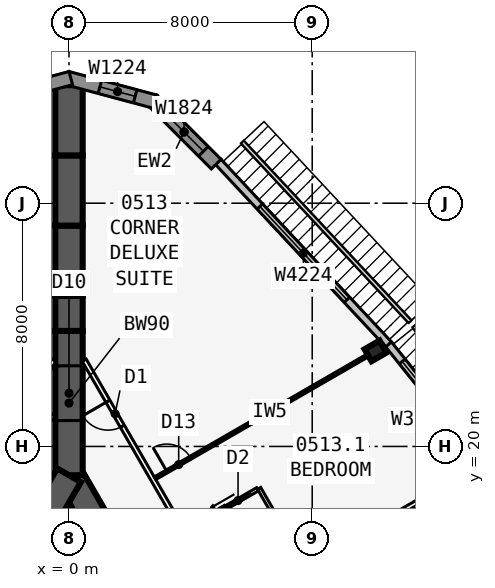
"""IFC4 building model, lengths in metres.
Left out: names, types, materials, properties, quantities, classifications, styles, units other than length and angle.
Written with IfcOpenShell. Run it as: python <this file> out.ifc"""

import sys

from ifc_helpers import new_model, si_unit, direction, frame, frame_2d, origin, origin_2d, place, context, subcontext, project, spatial, polyline, rectangle, i_section, outline, extrude, element, fill, save


model = new_model("IFC4")
c1 = context("Model", 3, precision=1e-05, world=origin(), true_north=direction((0.0, 1.0)))
c2 = subcontext(c1, "Body", "Model", "MODEL_VIEW")
j1 = project(units=[si_unit("LENGTHUNIT", "METRE"), si_unit("PLANEANGLEUNIT", "RADIAN")], contexts=[c1])
p1 = place(None, origin())
s1 = spatial("IfcSite", under=j1, at=p1, CompositionType="ELEMENT")
p2 = place(p1, origin())
s2 = spatial("IfcBuilding", under=s1, at=p2, CompositionType="ELEMENT")
p3 = place(p2, frame((0.0, 0.0, 28.5)))
s3 = spatial("IfcBuildingStorey", under=s2, at=p3, CompositionType="ELEMENT", Elevation=28.5)
p4 = place(p3, frame((16.5, -9.526, 0.0), z_axis=(0.0, 0.0, 1.0), x_axis=(-0.499999749417, 0.866025548458, 0.0)))
e1 = element("IfcWall", 1, at=p4, inside=s3, PredefinedType="SHEAR", context=c2, shape_type="SweptSolid", body=[
    extrude(rectangle(XDim=33.0, YDim=0.9, at=frame_2d((16.5, 0.0))), origin(), (0.0, 0.0, 1.0), 3.4),
])
p5 = place(p4, frame((14.15, 0.0, 0.0)))
e2 = element("IfcOpeningElement", 2, at=p5, cuts=e1, PredefinedType="OPENING", context=c2, shape_type="SweptSolid", body=[
    extrude(rectangle(XDim=1.8, YDim=2.13, at=frame_2d((0.9, 1.065))), frame((0.0, 0.46, 0.0), z_axis=(0.0, -1.0, 0.0), x_axis=(1.0, 0.0, 0.0)), (0.0, 0.0, 1.0), 0.92),
])
p6 = place(p4, frame((12.6, 0.0, 0.0)))
e3 = element("IfcOpeningElement", 3, at=p6, cuts=e1, PredefinedType="OPENING", context=c2, shape_type="SweptSolid", body=[
    extrude(rectangle(XDim=1.0, YDim=2.13, at=frame_2d((0.5, 1.065))), frame((0.0, 0.46, 0.0), z_axis=(0.0, -1.0, 0.0), x_axis=(1.0, 0.0, 0.0)), (0.0, 0.0, 1.0), 0.92),
])
p7 = place(p3, frame((0.0, 19.052, 0.0), z_axis=(0.0, 0.0, 1.0), x_axis=(-0.499999749417, -0.866025548458, 0.0)))
e4 = element("IfcWall", 4, at=p7, inside=s3, PredefinedType="SHEAR", context=c2, shape_type="SweptSolid", body=[
    extrude(rectangle(XDim=33.0, YDim=0.9, at=frame_2d((16.5, 0.0))), origin(), (0.0, 0.0, 1.0), 3.4),
])
p8 = place(p7, frame((14.15, 0.0, 0.0)))
e5 = element("IfcOpeningElement", 5, at=p8, cuts=e4, PredefinedType="OPENING", context=c2, shape_type="SweptSolid", body=[
    extrude(rectangle(XDim=1.8, YDim=2.13, at=frame_2d((0.9, 1.065))), frame((0.0, 0.46, 0.0), z_axis=(0.0, -1.0, 0.0), x_axis=(1.0, 0.0, 0.0)), (0.0, 0.0, 1.0), 0.92),
])
p9 = place(p7, frame((12.6, 0.0, 0.0)))
e6 = element("IfcOpeningElement", 6, at=p9, cuts=e4, PredefinedType="OPENING", context=c2, shape_type="SweptSolid", body=[
    extrude(rectangle(XDim=1.0, YDim=2.13, at=frame_2d((0.5, 1.065))), frame((0.0, 0.46, 0.0), z_axis=(0.0, -1.0, 0.0), x_axis=(1.0, 0.0, 0.0)), (0.0, 0.0, 1.0), 0.92),
])
p10 = place(p3, frame((0.0, 19.052, 0.0), z_axis=(0.0, 0.0, 1.0), x_axis=(0.0, 1.0, 0.0)))
e7 = element("IfcWall", 7, at=p10, inside=s3, PredefinedType="SHEAR", context=c2, shape_type="SweptSolid", body=[
    extrude(rectangle(XDim=4.746, YDim=0.9, at=frame_2d((2.373, 0.0))), origin(), (0.0, 0.0, 1.0), 3.4),
])
p11 = place(p10, frame((1.8, 0.0, 0.0)))
e8 = element("IfcOpeningElement", 8, at=p11, cuts=e7, PredefinedType="OPENING", context=c2, shape_type="SweptSolid", body=[
    extrude(rectangle(XDim=1.8, YDim=2.13, at=frame_2d((0.9, 1.065))), frame((0.0, 0.46, 0.0), z_axis=(0.0, -1.0, 0.0), x_axis=(1.0, 0.0, 0.0)), (0.0, 0.0, 1.0), 0.92),
])
p12 = place(p3, frame((0.0, 23.799, 0.0), z_axis=(0.0, 0.0, 1.0), x_axis=(0.0, 1.0, 0.0)))
e9 = element("IfcWall", 9, at=p12, inside=s3, PredefinedType="SHEAR", context=c2, shape_type="SweptSolid", body=[
    extrude(rectangle(XDim=1.155, YDim=0.9, at=frame_2d((0.577, 0.0))), origin(), (0.0, 0.0, 1.0), 3.4),
])
p13 = place(p3, frame((0.0, 24.953, 0.0), z_axis=(0.0, 0.0, 1.0), x_axis=(0.0, 1.0, 0.0)))
e10 = element("IfcWall", 10, at=p13, inside=s3, PredefinedType="SHEAR", context=c2, shape_type="SweptSolid", body=[
    extrude(rectangle(XDim=2.309, YDim=0.9, at=frame_2d((1.155, 0.0))), origin(), (0.0, 0.0, 1.0), 3.4),
])
p14 = place(p3, frame((0.0, 27.263, 0.0), z_axis=(0.0, 0.0, 1.0), x_axis=(0.0, 1.0, 0.0)))
e11 = element("IfcWall", 11, at=p14, inside=s3, PredefinedType="SHEAR", context=c2, shape_type="SweptSolid", body=[
    extrude(rectangle(XDim=2.31, YDim=0.9, at=frame_2d((1.155, 0.0))), origin(), (0.0, 0.0, 1.0), 3.4),
])
p15 = place(p3, frame((0.0, 29.572, 0.0), z_axis=(0.0, 0.0, 1.0), x_axis=(0.0, 1.0, 0.0)))
e12 = element("IfcWall", 12, at=p15, inside=s3, PredefinedType="SHEAR", context=c2, shape_type="SweptSolid", body=[
    extrude(rectangle(XDim=2.309, YDim=0.9, at=frame_2d((1.155, 0.0))), origin(), (0.0, 0.0, 1.0), 3.4),
])
p16 = place(p3, frame((10.083, 23.142, 0.0), z_axis=(0.0, 0.0, 1.0), x_axis=(-0.5, 0.866025403784, 0.0)))
e13 = element("IfcColumn", 13, at=p16, inside=s3, PredefinedType="COLUMN", context=c2, shape_type="SweptSolid", body=[
    extrude(i_section(OverallWidth=0.455, OverallDepth=0.569, WebThickness=0.078, FlangeThickness=0.125, at=origin_2d()), origin(), (0.0, 0.0, 1.0), 3.4),
])
p17 = place(p3, frame((13.664, 19.414, 0.0), z_axis=(0.0, 0.0, 1.0), x_axis=(-0.624594965756, 0.780948864364, 0.0)))
e14 = element("IfcWall", 14, at=p17, inside=s3, PredefinedType="STANDARD", context=c2, shape_type="SweptSolid", body=[
    extrude(rectangle(XDim=5.058, YDim=0.25, at=frame_2d((2.529, 0.0))), origin(), (0.0, 0.0, 1.0), 3.235),
])
p18 = place(p17, frame((0.729, 0.0, 0.45)))
e15 = element("IfcOpeningElement", 15, at=p18, cuts=e14, PredefinedType="OPENING", context=c2, shape_type="SweptSolid", body=[
    extrude(rectangle(XDim=3.6, YDim=2.4, at=frame_2d((1.8, 1.2))), frame((0.0, 0.135, 0.0), z_axis=(0.0, -1.0, 0.0), x_axis=(1.0, 0.0, 0.0)), (0.0, 0.0, 1.0), 0.27),
])
p19 = place(p3, frame((10.511, 23.357, 0.0), z_axis=(0.0, 0.0, 1.0), x_axis=(-0.682289646561, 0.731081964075, 0.0)))
e16 = element("IfcWall", 16, at=p19, inside=s3, PredefinedType="STANDARD", context=c2, shape_type="SweptSolid", body=[
    extrude(rectangle(XDim=8.211, YDim=0.25, at=frame_2d((4.105, 0.0))), origin(), (0.0, 0.0, 1.0), 3.235),
])
p20 = place(p19, frame((2.006, 0.0, 0.45)))
e17 = element("IfcOpeningElement", 17, at=p20, cuts=e16, PredefinedType="OPENING", context=c2, shape_type="SweptSolid", body=[
    extrude(rectangle(XDim=4.2, YDim=2.4, at=frame_2d((2.1, 1.2))), frame((0.0, 0.135, 0.0), z_axis=(0.0, -1.0, 0.0), x_axis=(1.0, 0.0, 0.0)), (0.0, 0.0, 1.0), 0.27),
])
p21 = place(p3, frame((4.841, 29.286, 0.0), z_axis=(0.0, 0.0, 1.0), x_axis=(-0.707106781187, 0.707106781187, 0.0)))
e18 = element("IfcWall", 18, at=p21, inside=s3, PredefinedType="SOLIDWALL", context=c2, shape_type="SweptSolid", body=[
    extrude(rectangle(XDim=2.988, YDim=0.45, at=frame_2d((1.494, 0.0))), origin(), (0.0, 0.0, 1.0), 3.235),
])
p22 = place(p21, frame((0.594, 0.0, 0.45)))
e19 = element("IfcOpeningElement", 19, at=p22, cuts=e18, PredefinedType="OPENING", context=c2, shape_type="SweptSolid", body=[
    extrude(rectangle(XDim=1.8, YDim=2.4, at=frame_2d((0.9, 1.2))), frame((0.0, 0.235, 0.0), z_axis=(0.0, -1.0, 0.0), x_axis=(1.0, 0.0, 0.0)), (0.0, 0.0, 1.0), 0.47),
])
p23 = place(p3, frame((2.829, 31.341, 0.0), z_axis=(0.0, 0.0, 1.0), x_axis=(-0.965930548995, 0.258801419081, 0.0)))
e20 = element("IfcWall", 20, at=p23, inside=s3, PredefinedType="SOLIDWALL", context=c2, shape_type="SweptSolid", body=[
    extrude(outline(polyline([(2.989, 0.225), (2.929, 0.225), (2.438, 0.093), (2.402, 0.225), (0.0, 0.225), (0.0, -0.225), (2.989, -0.225), (2.989, 0.225)])), origin(), (0.0, 0.0, 1.0), 3.235),
])
p24 = place(p23, frame((0.676, 0.0, 0.45)))
e21 = element("IfcOpeningElement", 21, at=p24, cuts=e20, PredefinedType="OPENING", context=c2, shape_type="SweptSolid", body=[
    extrude(rectangle(XDim=1.2, YDim=2.4, at=frame_2d((0.6, 1.2))), frame((0.0, 0.235, 0.0), z_axis=(0.0, -1.0, 0.0), x_axis=(1.0, 0.0, 0.0)), (0.0, 0.0, 1.0), 0.47),
])
p25 = place(p3, frame((0.058, 32.114, 0.0), z_axis=(0.0, 0.0, 1.0), x_axis=(-0.965930548995, -0.258801419081, 0.0)))
e22 = element("IfcWall", 22, at=p25, inside=s3, PredefinedType="SOLIDWALL", context=c2, shape_type="SweptSolid", body=[
    extrude(outline(polyline([(2.989, 0.225), (0.586, 0.225), (0.551, 0.093), (0.059, 0.225), (0.0, 0.225), (0.0, -0.225), (2.989, -0.225), (2.989, 0.225)])), origin(), (0.0, 0.0, 1.0), 3.235),
])
p26 = place(p25, frame((1.113, 0.0, 0.45)))
e23 = element("IfcOpeningElement", 23, at=p26, cuts=e22, PredefinedType="OPENING", context=c2, shape_type="SweptSolid", body=[
    extrude(rectangle(XDim=1.2, YDim=2.4, at=frame_2d((0.6, 1.2))), frame((0.0, 0.235, 0.0), z_axis=(0.0, -1.0, 0.0), x_axis=(1.0, 0.0, 0.0)), (0.0, 0.0, 1.0), 0.47),
])
p27 = place(p3, frame((20.027, -10.985, 0.0), z_axis=(0.0, 0.0, 1.0), x_axis=(-0.500001677587, 0.866024435227, 0.0)))
e24 = element("IfcWall", 24, at=p27, inside=s3, PredefinedType="PARTITIONING", context=c2, shape_type="SweptSolid", body=[
    extrude(rectangle(XDim=39.054, YDim=0.15, at=frame_2d((19.527, 0.0))), origin(), (0.0, 0.0, 1.0), 3.235),
])
p28 = place(p27, frame((0.352, 0.0, 0.0)))
e25 = element("IfcOpeningElement", 25, at=p28, cuts=e24, PredefinedType="OPENING", context=c2, shape_type="SweptSolid", body=[
    extrude(rectangle(XDim=0.95, YDim=2.13, at=frame_2d((0.475, 1.065))), frame((0.0, 0.085, 0.0), z_axis=(0.0, -1.0, 0.0), x_axis=(1.0, 0.0, 0.0)), (0.0, 0.0, 1.0), 0.17),
])
p29 = place(p27, frame((5.952, 0.0, 0.0)))
e26 = element("IfcOpeningElement", 26, at=p29, cuts=e24, PredefinedType="OPENING", context=c2, shape_type="SweptSolid", body=[
    extrude(rectangle(XDim=0.95, YDim=2.13, at=frame_2d((0.475, 1.065))), frame((0.0, 0.085, 0.0), z_axis=(0.0, -1.0, 0.0), x_axis=(1.0, 0.0, 0.0)), (0.0, 0.0, 1.0), 0.17),
])
p30 = place(p27, frame((12.152, 0.0, 0.0)))
e27 = element("IfcOpeningElement", 27, at=p30, cuts=e24, PredefinedType="OPENING", context=c2, shape_type="SweptSolid", body=[
    extrude(rectangle(XDim=0.95, YDim=2.13, at=frame_2d((0.475, 1.065))), frame((0.0, 0.085, 0.0), z_axis=(0.0, -1.0, 0.0), x_axis=(1.0, 0.0, 0.0)), (0.0, 0.0, 1.0), 0.17),
])
p31 = place(p27, frame((15.952, 0.0, 0.0)))
e28 = element("IfcOpeningElement", 28, at=p31, cuts=e24, PredefinedType="OPENING", context=c2, shape_type="SweptSolid", body=[
    extrude(rectangle(XDim=0.95, YDim=2.13, at=frame_2d((0.475, 1.065))), frame((0.0, 0.085, 0.0), z_axis=(0.0, -1.0, 0.0), x_axis=(1.0, 0.0, 0.0)), (0.0, 0.0, 1.0), 0.17),
])
p32 = place(p27, frame((22.152, 0.0, 0.0)))
e29 = element("IfcOpeningElement", 29, at=p32, cuts=e24, PredefinedType="OPENING", context=c2, shape_type="SweptSolid", body=[
    extrude(rectangle(XDim=0.95, YDim=2.13, at=frame_2d((0.475, 1.065))), frame((0.0, 0.085, 0.0), z_axis=(0.0, -1.0, 0.0), x_axis=(1.0, 0.0, 0.0)), (0.0, 0.0, 1.0), 0.17),
])
p33 = place(p27, frame((25.952, 0.0, 0.0)))
e30 = element("IfcOpeningElement", 30, at=p33, cuts=e24, PredefinedType="OPENING", context=c2, shape_type="SweptSolid", body=[
    extrude(rectangle(XDim=0.95, YDim=2.13, at=frame_2d((0.475, 1.065))), frame((0.0, 0.085, 0.0), z_axis=(0.0, -1.0, 0.0), x_axis=(1.0, 0.0, 0.0)), (0.0, 0.0, 1.0), 0.17),
])
p34 = place(p27, frame((36.546, 0.0, 0.0)))
e31 = element("IfcOpeningElement", 31, at=p34, cuts=e24, PredefinedType="OPENING", context=c2, shape_type="SweptSolid", body=[
    extrude(rectangle(XDim=0.95, YDim=2.13, at=frame_2d((0.475, 1.065))), frame((0.0, 0.085, 0.0), z_axis=(0.0, -1.0, 0.0), x_axis=(1.0, 0.0, 0.0)), (0.0, 0.0, 1.0), 0.17),
])
p35 = place(p3, frame((5.329, 14.623, 0.0), z_axis=(0.0, 0.0, 1.0), x_axis=(0.866018409083, 0.500012114982, 0.0)))
e32 = element("IfcWall", 32, at=p35, inside=s3, PredefinedType="PARTITIONING", context=c2, shape_type="SweptSolid", body=[
    extrude(rectangle(XDim=9.485, YDim=0.15, at=frame_2d((4.742, 0.0))), origin(), (0.0, 0.0, 1.0), 2.389),
])
p36 = place(p3, frame((2.829, 18.954, 0.0), z_axis=(0.0, 0.0, 1.0), x_axis=(0.866020536561, 0.500008430184, 0.0)))
e33 = element("IfcWall", 33, at=p36, inside=s3, PredefinedType="PARTITIONING", context=c2, shape_type="SweptSolid", body=[
    extrude(rectangle(XDim=8.72, YDim=0.1, at=frame_2d((4.36, 0.0))), origin(), (0.0, 0.0, 1.0), 2.389),
])
p37 = place(p36, frame((0.45, 0.0, 0.0)))
e34 = element("IfcOpeningElement", 34, at=p37, cuts=e33, PredefinedType="OPENING", context=c2, shape_type="SweptSolid", body=[
    extrude(rectangle(XDim=0.9, YDim=2.13, at=frame_2d((0.45, 1.065))), frame((0.0, 0.06, 0.0), z_axis=(0.0, -1.0, 0.0), x_axis=(1.0, 0.0, 0.0)), (0.0, 0.0, 1.0), 0.12),
])
p38 = place(p3, frame((7.753, 16.023, 0.0), z_axis=(0.0, 0.0, 1.0), x_axis=(-0.499990139034, 0.866031096941, 0.0)))
e35 = element("IfcWall", 35, at=p38, inside=s3, PredefinedType="PLUMBINGWALL", context=c2, shape_type="SweptSolid", body=[
    extrude(rectangle(XDim=3.0, YDim=0.12, at=frame_2d((1.5, 0.0))), origin(), (0.0, 0.0, 1.0), 3.235),
])
p39 = place(p3, frame((3.829, 17.221, 0.0), z_axis=(0.0, 0.0, 1.0), x_axis=(0.865997131366, 0.500048966069, 0.0)))
e36 = element("IfcWall", 36, at=p39, inside=s3, PredefinedType="PLUMBINGWALL", context=c2, shape_type="SweptSolid", body=[
    extrude(rectangle(XDim=2.74, YDim=0.12, at=frame_2d((1.37, 0.0))), origin(), (0.0, 0.0, 1.0), 3.235),
])
p40 = place(p39, frame((1.55, 0.0, 0.0)))
e37 = element("IfcOpeningElement", 37, at=p40, cuts=e36, PredefinedType="OPENING", context=c2, shape_type="SweptSolid", body=[
    extrude(rectangle(XDim=0.9, YDim=2.13, at=frame_2d((0.45, 1.065))), frame((0.0, 0.07, 0.0), z_axis=(0.0, -1.0, 0.0), x_axis=(1.0, 0.0, 0.0)), (0.0, 0.0, 1.0), 0.14),
])
p41 = place(p3, frame((-0.5, 22.836, 0.0), z_axis=(0.0, 0.0, 1.0), x_axis=(-0.500001677587, -0.866024435227, 0.0)))
e38 = element("IfcWall", 38, at=p41, inside=s3, PredefinedType="PARTITIONING", context=c2, shape_type="SweptSolid", body=[
    extrude(rectangle(XDim=39.054, YDim=0.15, at=frame_2d((19.527, 0.0))), origin(), (0.0, 0.0, 1.0), 3.235),
])
p42 = place(p41, frame((1.558, 0.0, 0.0)))
e39 = element("IfcOpeningElement", 39, at=p42, cuts=e38, PredefinedType="OPENING", context=c2, shape_type="SweptSolid", body=[
    extrude(rectangle(XDim=0.95, YDim=2.13, at=frame_2d((0.475, 1.065))), frame((0.0, 0.085, 0.0), z_axis=(0.0, -1.0, 0.0), x_axis=(1.0, 0.0, 0.0)), (0.0, 0.0, 1.0), 0.17),
])
p43 = place(p41, frame((15.352, 0.0, 0.0)))
e40 = element("IfcOpeningElement", 40, at=p43, cuts=e38, PredefinedType="OPENING", context=c2, shape_type="SweptSolid", body=[
    extrude(rectangle(XDim=0.95, YDim=2.13, at=frame_2d((0.475, 1.065))), frame((0.0, 0.085, 0.0), z_axis=(0.0, -1.0, 0.0), x_axis=(1.0, 0.0, 0.0)), (0.0, 0.0, 1.0), 0.17),
])
p44 = place(p41, frame((22.752, 0.0, 0.0)))
e41 = element("IfcOpeningElement", 41, at=p44, cuts=e38, PredefinedType="OPENING", context=c2, shape_type="SweptSolid", body=[
    extrude(rectangle(XDim=0.95, YDim=2.13, at=frame_2d((0.475, 1.065))), frame((0.0, 0.085, 0.0), z_axis=(0.0, -1.0, 0.0), x_axis=(1.0, 0.0, 0.0)), (0.0, 0.0, 1.0), 0.17),
])
p45 = place(p41, frame((30.952, 0.0, 0.0)))
e42 = element("IfcOpeningElement", 42, at=p45, cuts=e38, PredefinedType="OPENING", context=c2, shape_type="SweptSolid", body=[
    extrude(rectangle(XDim=0.95, YDim=2.13, at=frame_2d((0.475, 1.065))), frame((0.0, 0.085, 0.0), z_axis=(0.0, -1.0, 0.0), x_axis=(1.0, 0.0, 0.0)), (0.0, 0.0, 1.0), 0.17),
])
p46 = place(p41, frame((37.752, 0.0, 0.0)))
e43 = element("IfcOpeningElement", 43, at=p46, cuts=e38, PredefinedType="OPENING", context=c2, shape_type="SweptSolid", body=[
    extrude(rectangle(XDim=0.95, YDim=2.13, at=frame_2d((0.475, 1.065))), frame((0.0, 0.085, 0.0), z_axis=(0.0, -1.0, 0.0), x_axis=(1.0, 0.0, 0.0)), (0.0, 0.0, 1.0), 0.17),
])
p47 = place(p18, origin())
e44 = element("IfcWindow", 44, at=p47, inside=s3, PartitioningType="SINGLE_PANEL", PredefinedType="WINDOW", context=c2, shape_type="SweptSolid", body=[
    extrude(rectangle(XDim=3.6, YDim=2.4, at=frame_2d((1.8, 1.2))), frame((0.0, 0.03, 0.0), z_axis=(0.0, -1.0, 0.0), x_axis=(1.0, 0.0, 0.0)), (0.0, 0.0, 1.0), 0.06),
])
fill(e15, e44)
p48 = place(p20, origin())
e45 = element("IfcWindow", 45, at=p48, inside=s3, PartitioningType="SINGLE_PANEL", PredefinedType="WINDOW", context=c2, shape_type="SweptSolid", body=[
    extrude(rectangle(XDim=4.2, YDim=2.4, at=frame_2d((2.1, 1.2))), frame((0.0, 0.03, 0.0), z_axis=(0.0, -1.0, 0.0), x_axis=(1.0, 0.0, 0.0)), (0.0, 0.0, 1.0), 0.06),
])
fill(e17, e45)
p49 = place(p22, origin())
e46 = element("IfcWindow", 46, at=p49, inside=s3, PartitioningType="SINGLE_PANEL", PredefinedType="WINDOW", context=c2, shape_type="SweptSolid", body=[
    extrude(rectangle(XDim=1.8, YDim=2.4, at=frame_2d((0.9, 1.2))), frame((0.0, 0.03, 0.0), z_axis=(0.0, -1.0, 0.0), x_axis=(1.0, 0.0, 0.0)), (0.0, 0.0, 1.0), 0.06),
])
fill(e19, e46)
p50 = place(p24, origin())
e47 = element("IfcWindow", 47, at=p50, inside=s3, PartitioningType="SINGLE_PANEL", PredefinedType="WINDOW", context=c2, shape_type="SweptSolid", body=[
    extrude(rectangle(XDim=1.2, YDim=2.4, at=frame_2d((0.6, 1.2))), frame((0.0, 0.03, 0.0), z_axis=(0.0, -1.0, 0.0), x_axis=(1.0, 0.0, 0.0)), (0.0, 0.0, 1.0), 0.06),
])
fill(e21, e47)
p51 = place(p37, origin())
e48 = element("IfcDoor", 48, at=p51, inside=s3, OperationType="SINGLE_SWING_LEFT", PredefinedType="DOOR", context=c2, shape_type="SweptSolid", body=[
    extrude(rectangle(XDim=0.9, YDim=2.13, at=frame_2d((0.45, 1.065))), frame((0.0, 0.025, 0.0), z_axis=(0.0, -1.0, 0.0), x_axis=(1.0, 0.0, 0.0)), (0.0, 0.0, 1.0), 0.05),
])
fill(e34, e48)
p52 = place(p40, origin())
e49 = element("IfcDoor", 49, at=p52, inside=s3, OperationType="SLIDING_TO_LEFT", PredefinedType="DOOR", context=c2, shape_type="SweptSolid", body=[
    extrude(rectangle(XDim=0.9, YDim=2.13, at=frame_2d((0.45, 1.065))), frame((0.0, 0.025, 0.0), z_axis=(0.0, -1.0, 0.0), x_axis=(1.0, 0.0, 0.0)), (0.0, 0.0, 1.0), 0.05),
])
fill(e37, e49)
p53 = place(p34, origin())
e50 = element("IfcDoor", 50, at=p53, inside=s3, OperationType="SINGLE_SWING_RIGHT", PredefinedType="DOOR", context=c2, shape_type="SweptSolid", body=[
    extrude(rectangle(XDim=0.95, YDim=2.13, at=frame_2d((0.475, 1.065))), frame((0.0, 0.025, 0.0), z_axis=(0.0, -1.0, 0.0), x_axis=(1.0, 0.0, 0.0)), (0.0, 0.0, 1.0), 0.05),
])
fill(e31, e50)
p54 = place(p11, origin())
e51 = element("IfcDoor", 51, at=p54, inside=s3, OperationType="DOUBLE_DOOR_DOUBLE_SWING", PredefinedType="DOOR", context=c2, shape_type="SweptSolid", body=[
    extrude(rectangle(XDim=1.8, YDim=2.13, at=frame_2d((0.9, 1.065))), frame((0.0, 0.025, 0.0), z_axis=(0.0, -1.0, 0.0), x_axis=(1.0, 0.0, 0.0)), (0.0, 0.0, 1.0), 0.05),
])
fill(e8, e51)
save(model, sys.argv[1])
